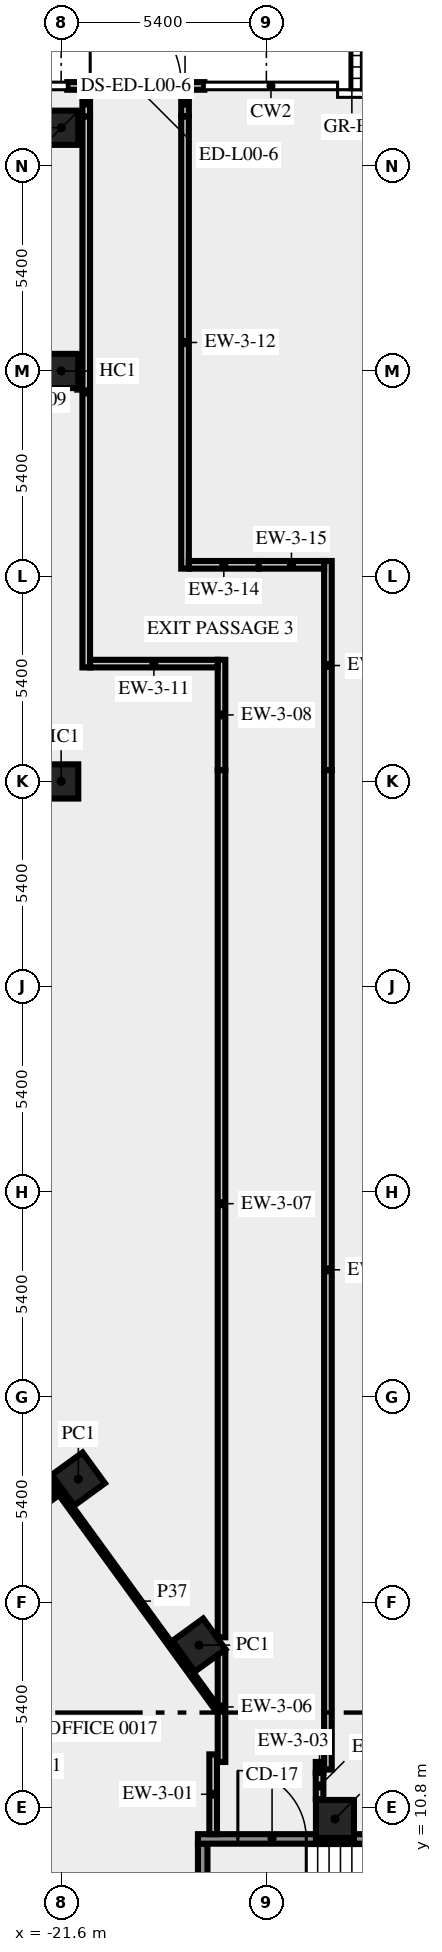
"""IFC4 building model, lengths in metres.
Left out: names, types, materials, properties, quantities, classifications, styles, units other than length and angle.
Written with IfcOpenShell. Run it as: python <this file> out.ifc"""

import sys

from ifc_helpers import new_model, si_unit, direction, frame, frame_2d, origin, origin_2d, place, context, subcontext, project, spatial, rectangle, circle, extrude, element, fill, save


model = new_model("IFC4")
c1 = context("Model", 3, precision=1e-05, world=origin(), true_north=direction((0.0, 1.0)))
c2 = subcontext(c1, "Body", "Model", "MODEL_VIEW")
j1 = project(units=[si_unit("LENGTHUNIT", "METRE"), si_unit("PLANEANGLEUNIT", "RADIAN")], contexts=[c1])
p1 = place(None, origin())
s1 = spatial("IfcSite", under=j1, at=p1, CompositionType="ELEMENT")
p2 = place(p1, origin())
s2 = spatial("IfcBuilding", under=s1, at=p2, CompositionType="ELEMENT")
p3 = place(p2, origin())
s3 = spatial("IfcBuildingStorey", under=s2, at=p3, CompositionType="ELEMENT", Elevation=0.0)
for number, where, z_axis, x_axis in (
    (1, (-17.974, 15.075, 0.0), (0.0, 0.0, 1.0), (-0.588, 0.809, 0.0)),
    (2, (-21.147, 19.444, 0.0), (0.0, 0.0, 1.0), (-0.588, 0.809, 0.0)),
    (3, (-14.395, 10.5, 0.0), (0.0, 0.0, 1.0), (-1.0, 0.0, 0.0)),
):
    element("IfcColumn", number, at=place(p3, frame(where, z_axis=z_axis, x_axis=x_axis)), inside=s3, PredefinedType="COLUMN", context=c2, shape_type="SweptSolid", body=[
        extrude(rectangle(XDim=1.0, YDim=1.0, at=origin_2d()), origin(), (0.0, 0.0, 1.0), 5.6),
    ])
for number, where, z_axis, x_axis in (
    (4, (-21.6, 37.8, 0.0), (0.0, 0.0, 1.0), (1.0, 0.0, 0.0)),
    (5, (-21.6, 48.6, 0.0), (0.0, 0.0, 1.0), (1.0, 0.0, 0.0)),
    (6, (-21.6, 55.0, 0.0), (0.0, 0.0, 1.0), (1.0, 0.0, 0.0)),
):
    element("IfcColumn", number, at=place(p3, frame(where, z_axis=z_axis, x_axis=x_axis)), inside=s3, PredefinedType="COLUMN", context=c2, shape_type="SweptSolid", body=[
        extrude(circle(Radius=0.45, at=origin_2d()), origin(), (0.0, 0.0, 1.0), 5.6),
    ])
p4 = place(p3, frame((-21.439, 56.1, 0.0), z_axis=(0.0, 0.0, 1.0), x_axis=(1.0, 0.0, 0.0)))
e7 = element("IfcWall", 7, at=p4, inside=s3, PredefinedType="SOLIDWALL", context=c2, shape_type="SweptSolid", body=[
    extrude(rectangle(XDim=3.606, YDim=0.2, at=frame_2d((1.803, 0.0))), origin(), (0.0, 0.0, 1.0), 5.6),
])
p5 = place(p4, frame((0.603, 0.0, 0.0)))
e8 = element("IfcOpeningElement", 8, at=p5, cuts=e7, PredefinedType="OPENING", context=c2, shape_type="SweptSolid", body=[
    extrude(rectangle(XDim=2.4, YDim=2.6, at=frame_2d((1.2, 1.3))), frame((0.0, 0.11, 0.0), z_axis=(0.0, -1.0, 0.0), x_axis=(1.0, 0.0, 0.0)), (0.0, 0.0, 1.0), 0.22),
])
p6 = place(p3, frame((-17.875, 4.5, 0.0), z_axis=(0.0, 0.0, 1.0), x_axis=(0.0, 1.0, 0.0)))
e9 = element("IfcWall", 9, at=p6, inside=s3, PredefinedType="SHEAR", context=c2, shape_type="SweptSolid", body=[
    extrude(rectangle(XDim=5.35, YDim=0.25, at=frame_2d((2.675, 0.0))), origin(), (0.0, 0.0, 1.0), 5.6),
])
p7 = place(p3, frame((-18.0, 9.975, 0.0), z_axis=(0.0, 0.0, 1.0), x_axis=(1.0, 0.0, 0.0)))
e10 = element("IfcWall", 10, at=p7, inside=s3, PredefinedType="SHEAR", context=c2, shape_type="SweptSolid", body=[
    extrude(rectangle(XDim=10.5, YDim=0.25, at=frame_2d((5.25, 0.0))), origin(), (0.0, 0.0, 1.0), 5.6),
])
p8 = place(p7, frame((1.05, 0.0, 0.0)))
e11 = element("IfcOpeningElement", 11, at=p8, cuts=e10, PredefinedType="OPENING", context=c2, shape_type="SweptSolid", body=[
    extrude(rectangle(XDim=1.8, YDim=2.1, at=frame_2d((0.9, 1.05))), frame((0.0, 0.135, 0.0), z_axis=(0.0, -1.0, 0.0), x_axis=(1.0, 0.0, 0.0)), (0.0, 0.0, 1.0), 0.27),
])
p9 = place(p7, frame((4.5, 0.0, 1.0)))
e12 = element("IfcOpeningElement", 12, at=p9, cuts=e10, PredefinedType="OPENING", context=c2, shape_type="SweptSolid", body=[
    extrude(rectangle(XDim=1.2, YDim=1.2, at=frame_2d((0.6, 0.6))), frame((0.0, 0.135, 0.0), z_axis=(0.0, -1.0, 0.0), x_axis=(1.0, 0.0, 0.0)), (0.0, 0.0, 1.0), 0.27),
])
p10 = place(p3, frame((-17.6, 10.1, 0.0), z_axis=(0.0, 0.0, 1.0), x_axis=(0.0, 1.0, 0.0)))
e13 = element("IfcWall", 13, at=p10, inside=s3, PredefinedType="SOLIDWALL", context=c2, shape_type="SweptSolid", body=[
    extrude(rectangle(XDim=2.1, YDim=0.2, at=frame_2d((1.05, 0.0))), origin(), (0.0, 0.0, 1.0), 5.6),
])
p11 = place(p3, frame((-14.8, 11.02, 0.0), z_axis=(0.0, 0.0, 1.0), x_axis=(0.0, 1.0, 0.0)))
e14 = element("IfcWall", 14, at=p11, inside=s3, PredefinedType="SOLIDWALL", context=c2, shape_type="SweptSolid", body=[
    extrude(rectangle(XDim=0.693, YDim=0.2, at=frame_2d((0.347, 0.0))), origin(), (0.0, 0.0, 1.0), 4.6),
])
p12 = place(p3, frame((-14.8, 11.713, 0.0), z_axis=(0.0, 0.0, 1.0), x_axis=(0.0, 1.0, 0.0)))
e15 = element("IfcWall", 15, at=p12, inside=s3, PredefinedType="SOLIDWALL", context=c2, shape_type="SweptSolid", body=[
    extrude(rectangle(XDim=0.287, YDim=0.2, at=frame_2d((0.143, 0.0))), origin(), (0.0, 0.0, 1.0), 5.6),
])
p13 = place(p3, frame((-14.58, 11.8, 0.0), z_axis=(0.0, 0.0, 1.0), x_axis=(0.0, 1.0, 0.0)))
e16 = element("IfcWall", 16, at=p13, inside=s3, PredefinedType="SOLIDWALL", context=c2, shape_type="SweptSolid", body=[
    extrude(rectangle(XDim=26.3, YDim=0.2, at=frame_2d((13.15, 0.0))), origin(), (0.0, 0.0, 1.0), 4.6),
])
p14 = place(p3, frame((-14.58, 38.1, 0.0), z_axis=(0.0, 0.0, 1.0), x_axis=(0.0, 1.0, 0.0)))
e17 = element("IfcWall", 17, at=p14, inside=s3, PredefinedType="SOLIDWALL", context=c2, shape_type="SweptSolid", body=[
    extrude(rectangle(XDim=5.5, YDim=0.2, at=frame_2d((2.75, 0.0))), origin(), (0.0, 0.0, 1.0), 5.6),
])
p15 = place(p3, frame((-17.38, 12.0, 0.0), z_axis=(0.0, 0.0, 1.0), x_axis=(0.0, 1.0, 0.0)))
e18 = element("IfcWall", 18, at=p15, inside=s3, PredefinedType="SOLIDWALL", context=c2, shape_type="SweptSolid", body=[
    extrude(rectangle(XDim=2.896, YDim=0.2, at=frame_2d((1.448, 0.0))), origin(), (0.0, 0.0, 1.0), 4.6),
])
p16 = place(p3, frame((-17.38, 15.28, 0.0), z_axis=(0.0, 0.0, 1.0), x_axis=(0.0, 1.0, 0.0)))
e19 = element("IfcWall", 19, at=p16, inside=s3, PredefinedType="SOLIDWALL", context=c2, shape_type="SweptSolid", body=[
    extrude(rectangle(XDim=22.82, YDim=0.2, at=frame_2d((11.41, 0.0))), origin(), (0.0, 0.0, 1.0), 4.6),
])
p17 = place(p3, frame((-17.38, 38.1, 0.0), z_axis=(0.0, 0.0, 1.0), x_axis=(0.0, 1.0, 0.0)))
e20 = element("IfcWall", 20, at=p17, inside=s3, PredefinedType="SOLIDWALL", context=c2, shape_type="SweptSolid", body=[
    extrude(rectangle(XDim=2.9, YDim=0.2, at=frame_2d((1.45, 0.0))), origin(), (0.0, 0.0, 1.0), 5.6),
])
p18 = place(p3, frame((-20.94, 40.8, 0.0), z_axis=(0.0, 0.0, 1.0), x_axis=(0.0, 1.0, 0.0)))
e21 = element("IfcWall", 21, at=p18, inside=s3, PredefinedType="SOLIDWALL", context=c2, shape_type="SweptSolid", body=[
    extrude(rectangle(XDim=14.5, YDim=0.2, at=frame_2d((7.25, 0.0))), origin(), (0.0, 0.0, 1.0), 4.6),
])
p19 = place(p3, frame((-20.94, 55.3, 0.0), z_axis=(0.0, 0.0, 1.0), x_axis=(0.0, 1.0, 0.0)))
e22 = element("IfcWall", 22, at=p19, inside=s3, PredefinedType="SOLIDWALL", context=c2, shape_type="SweptSolid", body=[
    extrude(rectangle(XDim=0.7, YDim=0.2, at=frame_2d((0.35, 0.0))), origin(), (0.0, 0.0, 1.0), 5.6),
])
p20 = place(p3, frame((-20.84, 40.9, 0.0), z_axis=(0.0, 0.0, 1.0), x_axis=(1.0, 0.0, 0.0)))
e23 = element("IfcWall", 23, at=p20, inside=s3, PredefinedType="SOLIDWALL", context=c2, shape_type="SweptSolid", body=[
    extrude(rectangle(XDim=3.36, YDim=0.2, at=frame_2d((1.68, 0.0))), origin(), (0.0, 0.0, 1.0), 5.6),
])
p21 = place(p3, frame((-18.34, 43.4, 0.0), z_axis=(0.0, 0.0, 1.0), x_axis=(0.0, 1.0, 0.0)))
e24 = element("IfcWall", 24, at=p21, inside=s3, PredefinedType="SOLIDWALL", context=c2, shape_type="SweptSolid", body=[
    extrude(rectangle(XDim=11.9, YDim=0.2, at=frame_2d((5.95, 0.0))), origin(), (0.0, 0.0, 1.0), 4.6),
])
p22 = place(p3, frame((-18.34, 55.3, 0.0), z_axis=(0.0, 0.0, 1.0), x_axis=(0.0, 1.0, 0.0)))
e25 = element("IfcWall", 25, at=p22, inside=s3, PredefinedType="SOLIDWALL", context=c2, shape_type="SweptSolid", body=[
    extrude(rectangle(XDim=0.7, YDim=0.2, at=frame_2d((0.35, 0.0))), origin(), (0.0, 0.0, 1.0), 5.6),
])
p23 = place(p3, frame((-18.24, 43.5, 0.0), z_axis=(0.0, 0.0, 1.0), x_axis=(1.0, 0.0, 0.0)))
e26 = element("IfcWall", 26, at=p23, inside=s3, PredefinedType="SOLIDWALL", context=c2, shape_type="SweptSolid", body=[
    extrude(rectangle(XDim=1.84, YDim=0.2, at=frame_2d((0.92, 0.0))), origin(), (0.0, 0.0, 1.0), 5.6),
])
p24 = place(p3, frame((-16.4, 43.5, 0.0), z_axis=(0.0, 0.0, 1.0), x_axis=(1.0, 0.0, 0.0)))
e27 = element("IfcWall", 27, at=p24, inside=s3, PredefinedType="SOLIDWALL", context=c2, shape_type="SweptSolid", body=[
    extrude(rectangle(XDim=1.72, YDim=0.2, at=frame_2d((0.86, 0.0))), origin(), (0.0, 0.0, 1.0), 4.8),
])
p25 = place(p3, frame((-20.531, -1.523, 0.0), z_axis=(0.0, 0.0, 1.0), x_axis=(-0.587784522481, 0.809017524614, 0.0)))
e28 = element("IfcWall", 28, at=p25, inside=s3, PredefinedType="SOLIDWALL", context=c2, shape_type="SweptSolid", body=[
    extrude(rectangle(XDim=49.912, YDim=0.25, at=frame_2d((24.956, 0.0))), origin(), (0.0, 0.0, 1.0), 5.6),
])
p26 = place(p25, frame((30.765, 0.0, 0.0)))
e29 = element("IfcOpeningElement", 29, at=p26, cuts=e28, PredefinedType="OPENING", context=c2, shape_type="SweptSolid", body=[
    extrude(rectangle(XDim=0.9, YDim=2.1, at=frame_2d((0.45, 1.05))), frame((0.0, 0.135, 0.0), z_axis=(0.0, -1.0, 0.0), x_axis=(1.0, 0.0, 0.0)), (0.0, 0.0, 1.0), 0.27),
])
p27 = place(p25, frame((22.416, 0.0, 0.0)))
e30 = element("IfcOpeningElement", 30, at=p27, cuts=e28, PredefinedType="OPENING", context=c2, shape_type="SweptSolid", body=[
    extrude(rectangle(XDim=0.9, YDim=2.1, at=frame_2d((0.45, 1.05))), frame((0.0, 0.135, 0.0), z_axis=(0.0, -1.0, 0.0), x_axis=(1.0, 0.0, 0.0)), (0.0, 0.0, 1.0), 0.27),
])
p28 = place(p25, frame((12.966, 0.0, 0.0)))
e31 = element("IfcOpeningElement", 31, at=p28, cuts=e28, PredefinedType="OPENING", context=c2, shape_type="SweptSolid", body=[
    extrude(rectangle(XDim=0.9, YDim=2.1, at=frame_2d((0.45, 1.05))), frame((0.0, 0.135, 0.0), z_axis=(0.0, -1.0, 0.0), x_axis=(1.0, 0.0, 0.0)), (0.0, 0.0, 1.0), 0.27),
])
p29 = place(p25, frame((29.016, 0.0, 0.0)))
e32 = element("IfcOpeningElement", 32, at=p29, cuts=e28, PredefinedType="OPENING", context=c2, shape_type="SweptSolid", body=[
    extrude(rectangle(XDim=0.9, YDim=2.1, at=frame_2d((0.45, 1.05))), frame((0.0, 0.135, 0.0), z_axis=(0.0, -1.0, 0.0), x_axis=(1.0, 0.0, 0.0)), (0.0, 0.0, 1.0), 0.27),
])
p30 = place(p3, frame((-37.232, 25.972, 0.0), z_axis=(0.0, 0.0, 1.0), x_axis=(0.587786323093, -0.809016216391, 0.0)))
e33 = element("IfcWall", 33, at=p30, inside=s3, PredefinedType="SOLIDWALL", context=c2, shape_type="SweptSolid", body=[
    extrude(rectangle(XDim=33.493, YDim=0.25, at=frame_2d((16.747, 0.0))), origin(), (0.0, 0.0, 1.0), 5.6),
])
p31 = place(p30, frame((6.462, 0.0, 0.0)))
e34 = element("IfcOpeningElement", 34, at=p31, cuts=e33, PredefinedType="OPENING", context=c2, shape_type="SweptSolid", body=[
    extrude(rectangle(XDim=1.8, YDim=2.1, at=frame_2d((0.9, 1.05))), frame((0.0, 0.135, 0.0), z_axis=(0.0, -1.0, 0.0), x_axis=(1.0, 0.0, 0.0)), (0.0, 0.0, 1.0), 0.27),
])
p32 = place(p30, frame((15.085, 0.0, 0.0)))
e35 = element("IfcOpeningElement", 35, at=p32, cuts=e33, PredefinedType="OPENING", context=c2, shape_type="SweptSolid", body=[
    extrude(rectangle(XDim=0.9, YDim=2.1, at=frame_2d((0.45, 1.05))), frame((0.0, 0.135, 0.0), z_axis=(0.0, -1.0, 0.0), x_axis=(1.0, 0.0, 0.0)), (0.0, 0.0, 1.0), 0.27),
])
p33 = place(p3, frame((-28.469, 14.124, 0.0), z_axis=(0.0, 0.0, 1.0), x_axis=(0.807603876984, 0.589725341053, 0.0)))
e36 = element("IfcWall", 36, at=p33, inside=s3, PredefinedType="PARTITIONING", context=c2, shape_type="SweptSolid", body=[
    extrude(rectangle(XDim=8.45, YDim=0.12, at=frame_2d((4.225, 0.0))), origin(), (0.0, 0.0, 1.0), 5.6),
])
p34 = place(p3, frame((-21.633, 19.091, 0.0), z_axis=(0.0, 0.0, 1.0), x_axis=(-0.587789647109, 0.809013801335, 0.0)))
e37 = element("IfcWall", 37, at=p34, inside=s3, PredefinedType="PARTITIONING", context=c2, shape_type="SweptSolid", body=[
    extrude(rectangle(XDim=14.745, YDim=0.12, at=frame_2d((7.373, 0.0))), origin(), (0.0, 0.0, 1.0), 5.6),
])
p35 = place(p3, frame((-17.48, 13.374, 0.0), z_axis=(0.0, 0.0, 1.0), x_axis=(-0.58772993032, 0.809057185251, 0.0)))
e38 = element("IfcWall", 38, at=p35, inside=s3, PredefinedType="PARTITIONING", context=c2, shape_type="SweptSolid", body=[
    extrude(rectangle(XDim=7.066, YDim=0.12, at=frame_2d((3.533, 0.0))), origin(), (0.0, 0.0, 1.0), 5.6),
])
p36 = place(p5, origin())
e39 = element("IfcDoor", 39, at=p36, inside=s3, OperationType="DOUBLE_DOOR_SINGLE_SWING", PredefinedType="DOOR", context=c2, shape_type="SweptSolid", body=[
    extrude(rectangle(XDim=2.4, YDim=2.6, at=frame_2d((1.2, 1.3))), frame((0.0, 0.025, 0.0), z_axis=(0.0, -1.0, 0.0), x_axis=(1.0, 0.0, 0.0)), (0.0, 0.0, 1.0), 0.05),
])
fill(e8, e39)
p37 = place(p8, origin())
e40 = element("IfcDoor", 40, at=p37, inside=s3, OperationType="DOUBLE_DOOR_SINGLE_SWING", PredefinedType="DOOR", context=c2, shape_type="SweptSolid", body=[
    extrude(rectangle(XDim=1.8, YDim=2.1, at=frame_2d((0.9, 1.05))), frame((0.0, 0.025, 0.0), z_axis=(0.0, -1.0, 0.0), x_axis=(1.0, 0.0, 0.0)), (0.0, 0.0, 1.0), 0.05),
])
fill(e11, e40)
save(model, sys.argv[1])
